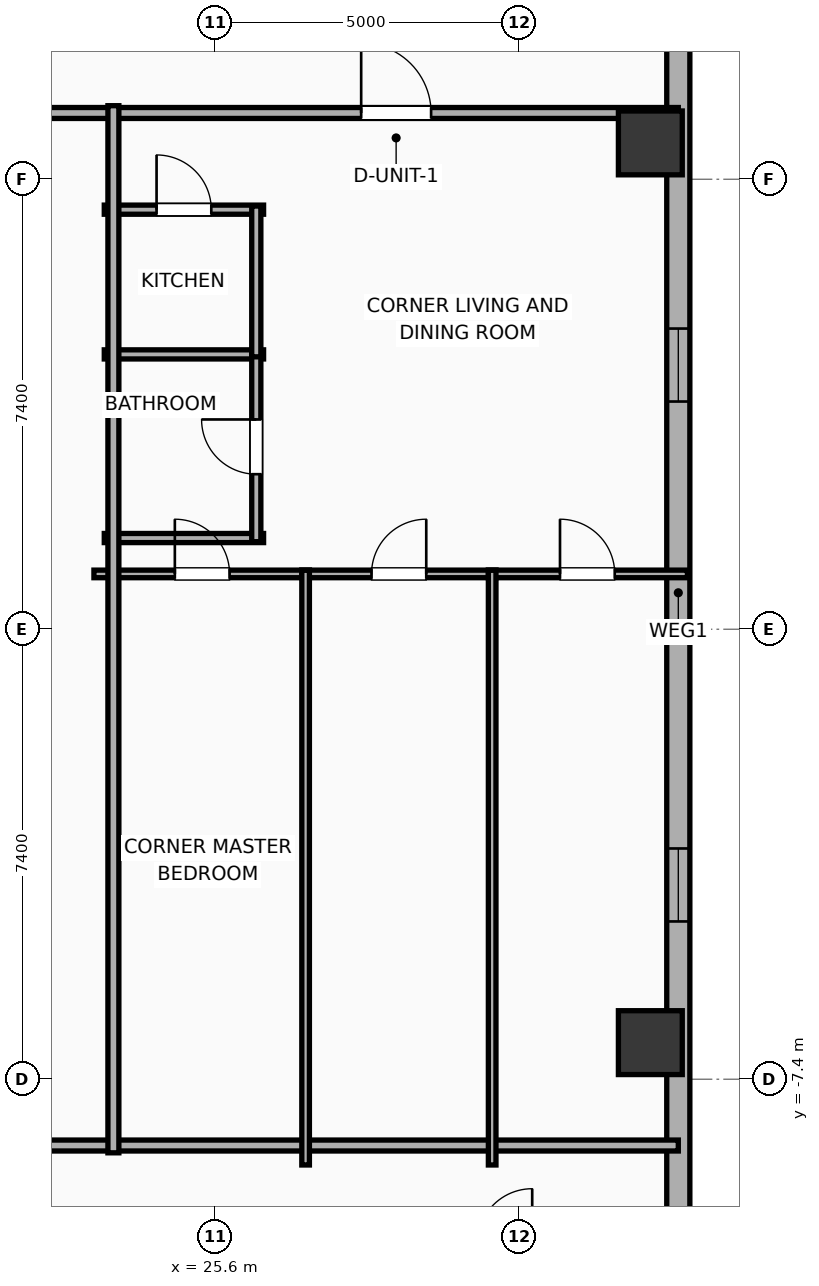
"""IFC4 building model, lengths in metres.
Left out: names, types, materials, properties, quantities, classifications, styles, units other than length and angle.
Written with IfcOpenShell. Run it as: python <this file> out.ifc"""

import sys

from ifc_helpers import new_model, si_unit, direction, frame, frame_2d, origin, origin_2d, place, context, subcontext, project, spatial, rectangle, hollow_rectangle, extrude, element, fill, save


model = new_model("IFC4")
c1 = context("Model", 3, precision=1e-05, world=origin(), true_north=direction((0.0, 1.0)))
c2 = subcontext(c1, "Body", "Model", "MODEL_VIEW")
j1 = project(units=[si_unit("LENGTHUNIT", "METRE"), si_unit("PLANEANGLEUNIT", "RADIAN")], contexts=[c1])
p1 = place(None, origin())
s1 = spatial("IfcSite", under=j1, at=p1, CompositionType="ELEMENT")
p2 = place(p1, origin())
s2 = spatial("IfcBuilding", under=s1, at=p2, CompositionType="ELEMENT")
p3 = place(p2, frame((0.0, 0.0, 105.3)))
s3 = spatial("IfcBuildingStorey", under=s2, at=p3, CompositionType="ELEMENT", Elevation=105.3)
for number, where, z_axis, x_axis in (
    (1, (32.75, -6.798, 0.0), (0.0, 0.0, 1.0), (1.0, 0.0, 0.0)),
    (2, (32.75, 7.998, 0.0), (0.0, 0.0, 1.0), (1.0, 0.0, 0.0)),
):
    element("IfcColumn", number, at=place(p3, frame(where, z_axis=z_axis, x_axis=x_axis)), inside=s3, PredefinedType="COLUMN", context=c2, shape_type="SweptSolid", body=[
        extrude(hollow_rectangle(XDim=1.05, YDim=1.05, WallThickness=0.036, at=origin_2d()), origin(), (0.0, 0.0, 1.0), 3.9),
    ])
p4 = place(p3, frame((33.21, 17.781, 0.0), z_axis=(0.0, 0.0, 1.0), x_axis=(0.0, -1.0, 0.0)))
e3 = element("IfcWall", 3, at=p4, inside=s3, PredefinedType="ELEMENTEDWALL", context=c2, shape_type="SweptSolid", body=[
    extrude(rectangle(XDim=34.363, YDim=0.38, at=frame_2d((17.181, 0.0))), origin(), (0.0, 0.0, 1.0), 3.65),
])
p5 = place(p4, frame((12.836, 0.0, 0.75)))
e4 = element("IfcOpeningElement", 4, at=p5, cuts=e3, PredefinedType="OPENING", context=c2, shape_type="SweptSolid", body=[
    extrude(rectangle(XDim=1.2, YDim=2.05, at=frame_2d((0.6, 1.025))), frame((0.0, 0.2, 0.0), z_axis=(0.0, -1.0, 0.0), x_axis=(1.0, 0.0, 0.0)), (0.0, 0.0, 1.0), 0.4),
])
p6 = place(p4, frame((21.386, 0.0, 0.75)))
e5 = element("IfcOpeningElement", 5, at=p6, cuts=e3, PredefinedType="OPENING", context=c2, shape_type="SweptSolid", body=[
    extrude(rectangle(XDim=1.2, YDim=2.05, at=frame_2d((0.6, 1.025))), frame((0.0, 0.2, 0.0), z_axis=(0.0, -1.0, 0.0), x_axis=(1.0, 0.0, 0.0)), (0.0, 0.0, 1.0), 0.4),
])
p7 = place(p3, frame((9.88, 8.49, 0.0), z_axis=(0.0, 0.0, 1.0), x_axis=(1.0, 0.0, 0.0)))
e6 = element("IfcWall", 6, at=p7, inside=s3, PredefinedType="PARTITIONING", context=c2, shape_type="SweptSolid", body=[
    extrude(rectangle(XDim=23.33, YDim=0.18, at=frame_2d((11.665, 0.0))), origin(), (0.0, 0.0, 1.0), 3.65),
])
p8 = place(p7, frame((18.115, 0.0, 0.0)))
e7 = element("IfcOpeningElement", 7, at=p8, cuts=e6, PredefinedType="OPENING", context=c2, shape_type="SweptSolid", body=[
    extrude(rectangle(XDim=1.15, YDim=2.05, at=frame_2d((0.575, 1.025))), frame((0.0, 0.1, 0.0), z_axis=(0.0, -1.0, 0.0), x_axis=(1.0, 0.0, 0.0)), (0.0, 0.0, 1.0), 0.2),
])
p9 = place(p3, frame((9.88, -8.49, 0.0), z_axis=(0.0, 0.0, 1.0), x_axis=(1.0, 0.0, 0.0)))
e8 = element("IfcWall", 8, at=p9, inside=s3, PredefinedType="PARTITIONING", context=c2, shape_type="SweptSolid", body=[
    extrude(rectangle(XDim=23.33, YDim=0.18, at=frame_2d((11.665, 0.0))), origin(), (0.0, 0.0, 1.0), 3.65),
])
p10 = place(p3, frame((23.77, 6.9, 0.0), z_axis=(0.0, 0.0, 1.0), x_axis=(1.0, 0.0, 0.0)))
e9 = element("IfcWall", 9, at=p10, inside=s3, PredefinedType="PLUMBINGWALL", context=c2, shape_type="SweptSolid", body=[
    extrude(rectangle(XDim=2.62, YDim=0.15, at=frame_2d((1.31, 0.0))), origin(), (0.0, 0.0, 1.0), 3.65),
])
p11 = place(p10, frame((0.86, 0.0, 0.0)))
e10 = element("IfcOpeningElement", 10, at=p11, cuts=e9, PredefinedType="OPENING", context=c2, shape_type="SweptSolid", body=[
    extrude(rectangle(XDim=0.9, YDim=2.05, at=frame_2d((0.45, 1.025))), frame((0.0, 0.085, 0.0), z_axis=(0.0, -1.0, 0.0), x_axis=(1.0, 0.0, 0.0)), (0.0, 0.0, 1.0), 0.17),
])
for number, where, z_axis, x_axis in (
    (11, (23.77, 4.52, 0.0), (0.0, 0.0, 1.0), (1.0, 0.0, 0.0)),
    (12, (23.77, 1.5, 0.0), (0.0, 0.0, 1.0), (1.0, 0.0, 0.0)),
):
    element("IfcWall", number, at=place(p3, frame(where, z_axis=z_axis, x_axis=x_axis)), inside=s3, PredefinedType="PLUMBINGWALL", context=c2, shape_type="SweptSolid", body=[
        extrude(rectangle(XDim=2.62, YDim=0.15, at=frame_2d((1.31, 0.0))), origin(), (0.0, 0.0, 1.0), 3.65),
    ])
p12 = place(p3, frame((26.27, 1.44, 0.0), z_axis=(0.0, 0.0, 1.0), x_axis=(0.0, 1.0, 0.0)))
e13 = element("IfcWall", 13, at=p12, inside=s3, PredefinedType="PLUMBINGWALL", context=c2, shape_type="SweptSolid", body=[
    extrude(rectangle(XDim=3.12, YDim=0.15, at=frame_2d((1.56, 0.0))), origin(), (0.0, 0.0, 1.0), 3.65),
])
p13 = place(p12, frame((1.11, 0.0, 0.0)))
e14 = element("IfcOpeningElement", 14, at=p13, cuts=e13, PredefinedType="OPENING", context=c2, shape_type="SweptSolid", body=[
    extrude(rectangle(XDim=0.9, YDim=2.05, at=frame_2d((0.45, 1.025))), frame((0.0, 0.085, 0.0), z_axis=(0.0, -1.0, 0.0), x_axis=(1.0, 0.0, 0.0)), (0.0, 0.0, 1.0), 0.17),
])
p14 = place(p3, frame((26.27, 4.48, 0.0), z_axis=(0.0, 0.0, 1.0), x_axis=(0.0, 1.0, 0.0)))
e15 = element("IfcWall", 15, at=p14, inside=s3, PredefinedType="PLUMBINGWALL", context=c2, shape_type="SweptSolid", body=[
    extrude(rectangle(XDim=2.48, YDim=0.15, at=frame_2d((1.24, 0.0))), origin(), (0.0, 0.0, 1.0), 3.65),
])
p15 = place(p3, frame((23.6, 0.91, 0.0), z_axis=(0.0, 0.0, 1.0), x_axis=(1.0, 0.0, 0.0)))
e16 = element("IfcWall", 16, at=p15, inside=s3, PredefinedType="PARTITIONING", context=c2, shape_type="SweptSolid", body=[
    extrude(rectangle(XDim=3.543, YDim=0.125, at=frame_2d((1.772, 0.0))), origin(), (0.0, 0.0, 1.0), 3.65),
])
p16 = place(p15, frame((1.331, 0.0, 0.0)))
e17 = element("IfcOpeningElement", 17, at=p16, cuts=e16, PredefinedType="OPENING", context=c2, shape_type="SweptSolid", body=[
    extrude(rectangle(XDim=0.9, YDim=2.05, at=frame_2d((0.45, 1.025))), frame((0.0, 0.073, 0.0), z_axis=(0.0, -1.0, 0.0), x_axis=(1.0, 0.0, 0.0)), (0.0, 0.0, 1.0), 0.145),
])
p17 = place(p3, frame((27.019, 0.91, 0.0), z_axis=(0.0, 0.0, 1.0), x_axis=(1.0, 0.0, 0.0)))
e18 = element("IfcWall", 18, at=p17, inside=s3, PredefinedType="PARTITIONING", context=c2, shape_type="SweptSolid", body=[
    extrude(rectangle(XDim=3.193, YDim=0.125, at=frame_2d((1.596, 0.0))), origin(), (0.0, 0.0, 1.0), 3.65),
])
p18 = place(p17, frame((1.146, 0.0, 0.0)))
e19 = element("IfcOpeningElement", 19, at=p18, cuts=e18, PredefinedType="OPENING", context=c2, shape_type="SweptSolid", body=[
    extrude(rectangle(XDim=0.9, YDim=2.05, at=frame_2d((0.45, 1.025))), frame((0.0, 0.073, 0.0), z_axis=(0.0, -1.0, 0.0), x_axis=(1.0, 0.0, 0.0)), (0.0, 0.0, 1.0), 0.145),
])
p19 = place(p3, frame((30.086, 0.91, 0.0), z_axis=(0.0, 0.0, 1.0), x_axis=(1.0, 0.0, 0.0)))
e20 = element("IfcWall", 20, at=p19, inside=s3, PredefinedType="PARTITIONING", context=c2, shape_type="SweptSolid", body=[
    extrude(rectangle(XDim=3.274, YDim=0.125, at=frame_2d((1.637, 0.0))), origin(), (0.0, 0.0, 1.0), 3.65),
])
p20 = place(p19, frame((1.178, 0.0, 0.0)))
e21 = element("IfcOpeningElement", 21, at=p20, cuts=e20, PredefinedType="OPENING", context=c2, shape_type="SweptSolid", body=[
    extrude(rectangle(XDim=0.9, YDim=2.05, at=frame_2d((0.45, 1.025))), frame((0.0, 0.073, 0.0), z_axis=(0.0, -1.0, 0.0), x_axis=(1.0, 0.0, 0.0)), (0.0, 0.0, 1.0), 0.145),
])
for number, where, z_axis, x_axis in (
    (22, (30.149, -8.81, 0.0), (0.0, 0.0, 1.0), (0.0, 1.0, 0.0)),
    (23, (27.081, -8.81, 0.0), (0.0, 0.0, 1.0), (0.0, 1.0, 0.0)),
):
    element("IfcWall", number, at=place(p3, frame(where, z_axis=z_axis, x_axis=x_axis)), inside=s3, PredefinedType="PARTITIONING", context=c2, shape_type="SweptSolid", body=[
        extrude(rectangle(XDim=9.78, YDim=0.125, at=frame_2d((4.89, 0.0))), origin(), (0.0, 0.0, 1.0), 3.65),
    ])
p21 = place(p3, frame((23.92, -8.61, 0.0), z_axis=(0.0, 0.0, 1.0), x_axis=(0.0, 1.0, 0.0)))
e24 = element("IfcWall", 24, at=p21, inside=s3, PredefinedType="PARTITIONING", context=c2, shape_type="SweptSolid", body=[
    extrude(rectangle(XDim=17.22, YDim=0.18, at=frame_2d((8.61, 0.0))), origin(), (0.0, 0.0, 1.0), 3.65),
])
p22 = place(p5, origin())
e25 = element("IfcWindow", 25, at=p22, inside=s3, PartitioningType="SINGLE_PANEL", PredefinedType="WINDOW", context=c2, shape_type="SweptSolid", body=[
    extrude(rectangle(XDim=1.2, YDim=2.05, at=frame_2d((0.6, 1.025))), frame((0.0, 0.03, 0.0), z_axis=(0.0, -1.0, 0.0), x_axis=(1.0, 0.0, 0.0)), (0.0, 0.0, 1.0), 0.06),
])
fill(e4, e25)
p23 = place(p6, origin())
e26 = element("IfcWindow", 26, at=p23, inside=s3, PartitioningType="SINGLE_PANEL", PredefinedType="WINDOW", context=c2, shape_type="SweptSolid", body=[
    extrude(rectangle(XDim=1.2, YDim=2.05, at=frame_2d((0.6, 1.025))), frame((0.0, 0.03, 0.0), z_axis=(0.0, -1.0, 0.0), x_axis=(1.0, 0.0, 0.0)), (0.0, 0.0, 1.0), 0.06),
])
fill(e5, e26)
p24 = place(p8, origin())
e27 = element("IfcDoor", 27, at=p24, inside=s3, OperationType="SINGLE_SWING_LEFT", PredefinedType="DOOR", context=c2, shape_type="SweptSolid", body=[
    extrude(rectangle(XDim=1.15, YDim=2.05, at=frame_2d((0.575, 1.025))), frame((0.0, 0.025, 0.0), z_axis=(0.0, -1.0, 0.0), x_axis=(1.0, 0.0, 0.0)), (0.0, 0.0, 1.0), 0.05),
])
fill(e7, e27)
p25 = place(p11, origin())
e28 = element("IfcDoor", 28, at=p25, inside=s3, OperationType="SINGLE_SWING_LEFT", PredefinedType="DOOR", context=c2, shape_type="SweptSolid", body=[
    extrude(rectangle(XDim=0.9, YDim=2.05, at=frame_2d((0.45, 1.025))), frame((0.0, 0.025, 0.0), z_axis=(0.0, -1.0, 0.0), x_axis=(1.0, 0.0, 0.0)), (0.0, 0.0, 1.0), 0.05),
])
fill(e10, e28)
p26 = place(p13, origin())
e29 = element("IfcDoor", 29, at=p26, inside=s3, OperationType="SINGLE_SWING_RIGHT", PredefinedType="DOOR", context=c2, shape_type="SweptSolid", body=[
    extrude(rectangle(XDim=0.9, YDim=2.05, at=frame_2d((0.45, 1.025))), frame((0.0, 0.025, 0.0), z_axis=(0.0, -1.0, 0.0), x_axis=(1.0, 0.0, 0.0)), (0.0, 0.0, 1.0), 0.05),
])
fill(e14, e29)
p27 = place(p16, origin())
e30 = element("IfcDoor", 30, at=p27, inside=s3, OperationType="SINGLE_SWING_LEFT", PredefinedType="DOOR", context=c2, shape_type="SweptSolid", body=[
    extrude(rectangle(XDim=0.9, YDim=2.05, at=frame_2d((0.45, 1.025))), frame((0.0, 0.025, 0.0), z_axis=(0.0, -1.0, 0.0), x_axis=(1.0, 0.0, 0.0)), (0.0, 0.0, 1.0), 0.05),
])
fill(e17, e30)
p28 = place(p18, origin())
e31 = element("IfcDoor", 31, at=p28, inside=s3, OperationType="SINGLE_SWING_RIGHT", PredefinedType="DOOR", context=c2, shape_type="SweptSolid", body=[
    extrude(rectangle(XDim=0.9, YDim=2.05, at=frame_2d((0.45, 1.025))), frame((0.0, 0.025, 0.0), z_axis=(0.0, -1.0, 0.0), x_axis=(1.0, 0.0, 0.0)), (0.0, 0.0, 1.0), 0.05),
])
fill(e19, e31)
p29 = place(p20, origin())
e32 = element("IfcDoor", 32, at=p29, inside=s3, OperationType="SINGLE_SWING_LEFT", PredefinedType="DOOR", context=c2, shape_type="SweptSolid", body=[
    extrude(rectangle(XDim=0.9, YDim=2.05, at=frame_2d((0.45, 1.025))), frame((0.0, 0.025, 0.0), z_axis=(0.0, -1.0, 0.0), x_axis=(1.0, 0.0, 0.0)), (0.0, 0.0, 1.0), 0.05),
])
fill(e21, e32)
save(model, sys.argv[1])
